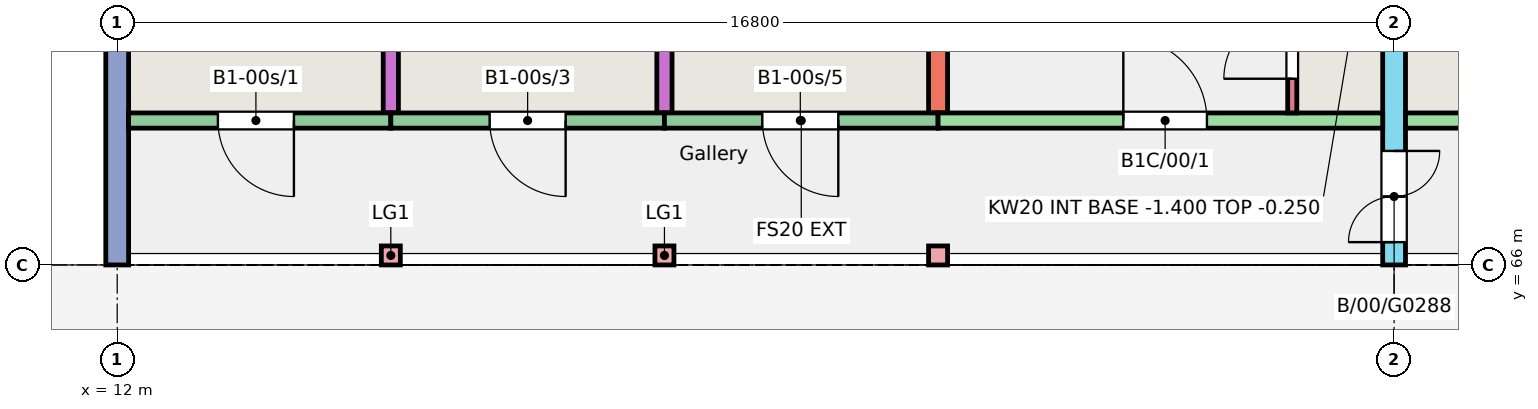
"""IFC4 building model, lengths in metres.
Left out: names, types, materials, properties, quantities, classifications, styles, units other than length and angle.
Written with IfcOpenShell. Run it as: python <this file> out.ifc"""

import sys

from ifc_helpers import new_model, si_unit, direction, frame, frame_2d, origin, origin_2d, place, context, subcontext, project, spatial, rectangle, extrude, element, fill, save


model = new_model("IFC4")
c1 = context("Model", 3, precision=1e-05, world=origin(), true_north=direction((0.0, 1.0)))
c2 = subcontext(c1, "Body", "Model", "MODEL_VIEW")
j1 = project(units=[si_unit("LENGTHUNIT", "METRE"), si_unit("PLANEANGLEUNIT", "RADIAN")], contexts=[c1])
p1 = place(None, origin())
s1 = spatial("IfcSite", under=j1, at=p1, CompositionType="ELEMENT")
p2 = place(p1, origin())
s2 = spatial("IfcBuilding", under=s1, at=p2, CompositionType="ELEMENT")
p3 = place(p2, origin())
s3 = spatial("IfcBuildingStorey", under=s2, at=p3, CompositionType="ELEMENT", Elevation=0.0)
p4 = place(p3, frame((12.0, 66.0, -0.25), z_axis=(0.0, 0.0, 1.0), x_axis=(0.0, 1.0, 0.0)))
e1 = element("IfcWall", 1, at=p4, inside=s3, PredefinedType="SHEAR", context=c2, shape_type="SweptSolid", body=[
    extrude(rectangle(XDim=11.0, YDim=0.3, at=frame_2d((5.5, 0.0))), origin(), (0.0, 0.0, 1.0), 3.25),
])
for number, where, z_axis, x_axis in (
    (2, (15.6, 68.0, -0.25), (0.0, 0.0, 1.0), (0.0, 1.0, 0.0)),
    (3, (19.2, 68.0, -0.25), (0.0, 0.0, 1.0), (0.0, 1.0, 0.0)),
):
    element("IfcWall", number, at=place(p3, frame(where, z_axis=z_axis, x_axis=x_axis)), inside=s3, PredefinedType="SHEAR", context=c2, shape_type="SweptSolid", body=[
        extrude(rectangle(XDim=9.0, YDim=0.2, at=frame_2d((4.5, 0.0))), origin(), (0.0, 0.0, 1.0), 3.25),
    ])
p5 = place(p3, frame((22.8, 68.0, -0.25), z_axis=(0.0, 0.0, 1.0), x_axis=(0.0, 1.0, 0.0)))
e4 = element("IfcWall", 4, at=p5, inside=s3, PredefinedType="SHEAR", context=c2, shape_type="SweptSolid", body=[
    extrude(rectangle(XDim=9.0, YDim=0.25, at=frame_2d((4.5, 0.0))), origin(), (0.0, 0.0, 1.0), 3.25),
])
p6 = place(p3, frame((28.8, 66.0, -0.25), z_axis=(0.0, 0.0, 1.0), x_axis=(0.0, 1.0, 0.0)))
e5 = element("IfcWall", 5, at=p6, inside=s3, PredefinedType="SHEAR", context=c2, shape_type="SweptSolid", body=[
    extrude(rectangle(XDim=11.0, YDim=0.3, at=frame_2d((5.5, 0.0))), origin(), (0.0, 0.0, 1.0), 3.25),
])
p7 = place(p6, frame((0.3, 0.0, 0.25)))
e6 = element("IfcOpeningElement", 6, at=p7, cuts=e5, PredefinedType="OPENING", context=c2, shape_type="SweptSolid", body=[
    extrude(rectangle(XDim=1.2, YDim=2.1, at=frame_2d((0.6, 1.05))), frame((0.0, 0.16, 0.0), z_axis=(0.0, -1.0, 0.0), x_axis=(1.0, 0.0, 0.0)), (0.0, 0.0, 1.0), 0.32),
])
p8 = place(p3, frame((12.15, 67.9, -0.25), z_axis=(0.0, 0.0, 1.0), x_axis=(1.0, 0.0, 0.0)))
e7 = element("IfcWall", 7, at=p8, inside=s3, PredefinedType="SOLIDWALL", context=c2, shape_type="SweptSolid", body=[
    extrude(rectangle(XDim=3.45, YDim=0.2, at=frame_2d((1.725, 0.0))), origin(), (0.0, 0.0, 1.0), 3.25),
])
p9 = place(p8, frame((1.175, 0.0, 0.25)))
e8 = element("IfcOpeningElement", 8, at=p9, cuts=e7, PredefinedType="OPENING", context=c2, shape_type="SweptSolid", body=[
    extrude(rectangle(XDim=1.0, YDim=2.1, at=frame_2d((0.5, 1.05))), frame((0.0, 0.11, 0.0), z_axis=(0.0, -1.0, 0.0), x_axis=(1.0, 0.0, 0.0)), (0.0, 0.0, 1.0), 0.22),
])
p10 = place(p3, frame((15.6, 67.9, -0.25), z_axis=(0.0, 0.0, 1.0), x_axis=(1.0, 0.0, 0.0)))
e9 = element("IfcWall", 9, at=p10, inside=s3, PredefinedType="SOLIDWALL", context=c2, shape_type="SweptSolid", body=[
    extrude(rectangle(XDim=3.6, YDim=0.2, at=frame_2d((1.8, 0.0))), origin(), (0.0, 0.0, 1.0), 3.25),
])
p11 = place(p10, frame((1.3, 0.0, 0.25)))
e10 = element("IfcOpeningElement", 10, at=p11, cuts=e9, PredefinedType="OPENING", context=c2, shape_type="SweptSolid", body=[
    extrude(rectangle(XDim=1.0, YDim=2.1, at=frame_2d((0.5, 1.05))), frame((0.0, 0.11, 0.0), z_axis=(0.0, -1.0, 0.0), x_axis=(1.0, 0.0, 0.0)), (0.0, 0.0, 1.0), 0.22),
])
p12 = place(p3, frame((19.2, 67.9, -0.25), z_axis=(0.0, 0.0, 1.0), x_axis=(1.0, 0.0, 0.0)))
e11 = element("IfcWall", 11, at=p12, inside=s3, PredefinedType="SOLIDWALL", context=c2, shape_type="SweptSolid", body=[
    extrude(rectangle(XDim=3.6, YDim=0.2, at=frame_2d((1.8, 0.0))), origin(), (0.0, 0.0, 1.0), 3.25),
])
p13 = place(p12, frame((1.288, 0.0, 0.25)))
e12 = element("IfcOpeningElement", 12, at=p13, cuts=e11, PredefinedType="OPENING", context=c2, shape_type="SweptSolid", body=[
    extrude(rectangle(XDim=1.0, YDim=2.1, at=frame_2d((0.5, 1.05))), frame((0.0, 0.11, 0.0), z_axis=(0.0, -1.0, 0.0), x_axis=(1.0, 0.0, 0.0)), (0.0, 0.0, 1.0), 0.22),
])
p14 = place(p3, frame((22.8, 67.9, -0.25), z_axis=(0.0, 0.0, 1.0), x_axis=(1.0, 0.0, 0.0)))
e13 = element("IfcWall", 13, at=p14, inside=s3, PredefinedType="SHEAR", context=c2, shape_type="SweptSolid", body=[
    extrude(rectangle(XDim=5.85, YDim=0.2, at=frame_2d((2.925, 0.0))), origin(), (0.0, 0.0, 1.0), 3.25),
])
p15 = place(p14, frame((2.438, 0.0, 0.25)))
e14 = element("IfcOpeningElement", 14, at=p15, cuts=e13, PredefinedType="OPENING", context=c2, shape_type="SweptSolid", body=[
    extrude(rectangle(XDim=1.1, YDim=2.1, at=frame_2d((0.55, 1.05))), frame((0.0, 0.11, 0.0), z_axis=(0.0, -1.0, 0.0), x_axis=(1.0, 0.0, 0.0)), (0.0, 0.0, 1.0), 0.22),
])
p16 = place(p3, frame((27.46, 68.0, -0.25), z_axis=(0.0, 0.0, 1.0), x_axis=(0.0, 1.0, 0.0)))
e15 = element("IfcWall", 15, at=p16, inside=s3, PredefinedType="SHEAR", context=c2, shape_type="SweptSolid", body=[
    extrude(rectangle(XDim=1.72, YDim=0.12, at=frame_2d((0.86, 0.0))), origin(), (0.0, 0.0, 1.0), 3.25),
])
p17 = place(p16, frame((0.45, 0.0, 0.25)))
e16 = element("IfcOpeningElement", 16, at=p17, cuts=e15, PredefinedType="OPENING", context=c2, shape_type="SweptSolid", body=[
    extrude(rectangle(XDim=0.9, YDim=2.1, at=frame_2d((0.45, 1.05))), frame((0.0, 0.07, 0.0), z_axis=(0.0, -1.0, 0.0), x_axis=(1.0, 0.0, 0.0)), (0.0, 0.0, 1.0), 0.14),
])
p18 = place(p3, frame((28.95, 67.9, -0.25), z_axis=(0.0, 0.0, 1.0), x_axis=(1.0, 0.0, 0.0)))
e17 = element("IfcWall", 17, at=p18, inside=s3, PredefinedType="SHEAR", context=c2, shape_type="SweptSolid", body=[
    extrude(rectangle(XDim=5.85, YDim=0.2, at=frame_2d((2.925, 0.0))), origin(), (0.0, 0.0, 1.0), 3.25),
])
p19 = place(p18, frame((2.312, 0.0, 0.25)))
e18 = element("IfcOpeningElement", 18, at=p19, cuts=e17, PredefinedType="OPENING", context=c2, shape_type="SweptSolid", body=[
    extrude(rectangle(XDim=1.1, YDim=2.1, at=frame_2d((0.55, 1.05))), frame((0.0, 0.11, 0.0), z_axis=(0.0, -1.0, 0.0), x_axis=(1.0, 0.0, 0.0)), (0.0, 0.0, 1.0), 0.22),
])
for number, where, z_axis, x_axis in (
    (19, (15.6, 66.125, -0.25), (0.0, 0.0, 1.0), (1.0, 0.0, 0.0)),
    (20, (19.2, 66.125, -0.25), (0.0, 0.0, 1.0), (1.0, 0.0, 0.0)),
    (21, (22.8, 66.125, -0.25), (0.0, 0.0, 1.0), (1.0, 0.0, 0.0)),
):
    element("IfcColumn", number, at=place(p3, frame(where, z_axis=z_axis, x_axis=x_axis)), inside=s3, PredefinedType="COLUMN", context=c2, shape_type="SweptSolid", body=[
        extrude(rectangle(XDim=0.25, YDim=0.25, at=origin_2d()), origin(), (0.0, 0.0, 1.0), 3.25),
    ])
p20 = place(p9, origin())
e22 = element("IfcDoor", 22, at=p20, inside=s3, OperationType="SINGLE_SWING_RIGHT", PredefinedType="DOOR", context=c2, shape_type="SweptSolid", body=[
    extrude(rectangle(XDim=1.0, YDim=2.1, at=frame_2d((0.5, 1.05))), frame((0.0, 0.025, 0.0), z_axis=(0.0, -1.0, 0.0), x_axis=(1.0, 0.0, 0.0)), (0.0, 0.0, 1.0), 0.05),
])
fill(e8, e22)
p21 = place(p11, origin())
e23 = element("IfcDoor", 23, at=p21, inside=s3, OperationType="SINGLE_SWING_RIGHT", PredefinedType="DOOR", context=c2, shape_type="SweptSolid", body=[
    extrude(rectangle(XDim=1.0, YDim=2.1, at=frame_2d((0.5, 1.05))), frame((0.0, 0.025, 0.0), z_axis=(0.0, -1.0, 0.0), x_axis=(1.0, 0.0, 0.0)), (0.0, 0.0, 1.0), 0.05),
])
fill(e10, e23)
p22 = place(p13, origin())
e24 = element("IfcDoor", 24, at=p22, inside=s3, OperationType="SINGLE_SWING_RIGHT", PredefinedType="DOOR", context=c2, shape_type="SweptSolid", body=[
    extrude(rectangle(XDim=1.0, YDim=2.1, at=frame_2d((0.5, 1.05))), frame((0.0, 0.025, 0.0), z_axis=(0.0, -1.0, 0.0), x_axis=(1.0, 0.0, 0.0)), (0.0, 0.0, 1.0), 0.05),
])
fill(e12, e24)
p23 = place(p15, origin())
e25 = element("IfcDoor", 25, at=p23, inside=s3, OperationType="SINGLE_SWING_LEFT", PredefinedType="DOOR", context=c2, shape_type="SweptSolid", body=[
    extrude(rectangle(XDim=1.1, YDim=2.1, at=frame_2d((0.55, 1.05))), frame((0.0, 0.025, 0.0), z_axis=(0.0, -1.0, 0.0), x_axis=(1.0, 0.0, 0.0)), (0.0, 0.0, 1.0), 0.05),
])
fill(e14, e25)
p24 = place(p17, origin())
e26 = element("IfcDoor", 26, at=p24, inside=s3, OperationType="SINGLE_SWING_LEFT", PredefinedType="DOOR", context=c2, shape_type="SweptSolid", body=[
    extrude(rectangle(XDim=0.9, YDim=2.1, at=frame_2d((0.45, 1.05))), frame((0.0, 0.025, 0.0), z_axis=(0.0, -1.0, 0.0), x_axis=(1.0, 0.0, 0.0)), (0.0, 0.0, 1.0), 0.05),
])
fill(e16, e26)
p25 = place(p7, origin())
e27 = element("IfcDoor", 27, at=p25, inside=s3, OperationType="DOUBLE_DOOR_SINGLE_SWING", PredefinedType="DOOR", context=c2, shape_type="SweptSolid", body=[
    extrude(rectangle(XDim=1.2, YDim=2.1, at=frame_2d((0.6, 1.05))), frame((0.0, 0.025, 0.0), z_axis=(0.0, -1.0, 0.0), x_axis=(1.0, 0.0, 0.0)), (0.0, 0.0, 1.0), 0.05),
])
fill(e6, e27)
save(model, sys.argv[1])
